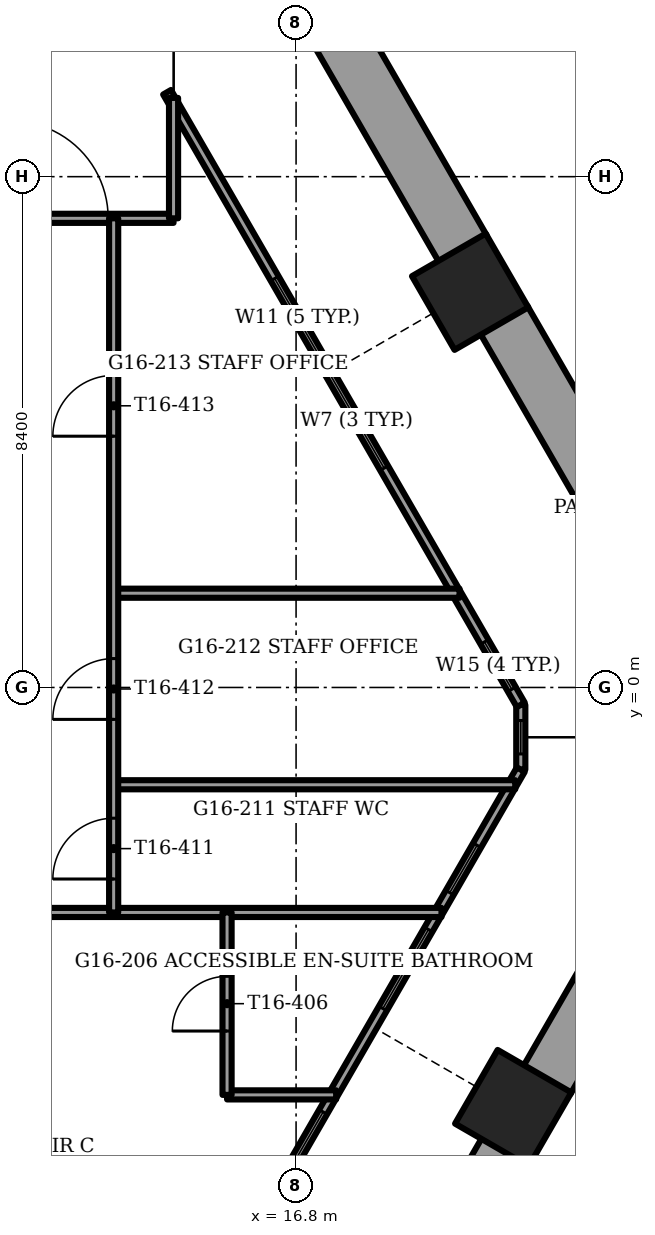
"""IFC4 building model, lengths in metres.
Left out: names, types, materials, properties, quantities, classifications, styles, units other than length and angle.
Written with IfcOpenShell. Run it as: python <this file> out.ifc"""

import sys

from ifc_helpers import new_model, si_unit, direction, frame, frame_2d, origin, origin_2d, place, context, subcontext, project, spatial, rectangle, extrude, element, fill, save


model = new_model("IFC4")
c1 = context("Model", 3, precision=1e-05, world=origin(), true_north=direction((0.0, 1.0)))
c2 = subcontext(c1, "Body", "Model", "MODEL_VIEW")
j1 = project(units=[si_unit("LENGTHUNIT", "METRE"), si_unit("PLANEANGLEUNIT", "RADIAN")], contexts=[c1])
p1 = place(None, origin())
s1 = spatial("IfcSite", under=j1, at=p1, CompositionType="ELEMENT")
p2 = place(p1, origin())
s2 = spatial("IfcBuilding", under=s1, at=p2, CompositionType="ELEMENT")
p3 = place(p2, frame((0.0, 0.0, 65.5)))
s3 = spatial("IfcBuildingStorey", under=s2, at=p3, CompositionType="ELEMENT", Elevation=65.5)
for number, where, z_axis, x_axis in (
    (1, (20.371, -6.917, -1.2), (0.0, 0.0, 1.0), (-0.5, -0.866, 0.0)),
    (2, (19.662, 6.508, -1.2), (0.0, 0.0, 1.0), (0.5, -0.866, 0.0)),
):
    element("IfcColumn", number, at=place(p3, frame(where, z_axis=z_axis, x_axis=x_axis)), inside=s3, PredefinedType="COLUMN", context=c2, shape_type="SweptSolid", body=[
        extrude(rectangle(XDim=1.4, YDim=1.4, at=origin_2d()), origin(), (0.0, 0.0, 1.0), 3.75),
    ])
p4 = place(p3, frame((16.727, -13.728, 0.0), z_axis=(0.0, 0.0, 1.0), x_axis=(0.499997206141, 0.866027016814, 0.0)))
e3 = element("IfcWall", 3, at=p4, inside=s3, PredefinedType="PARAPET", context=c2, shape_type="SweptSolid", body=[
    extrude(rectangle(XDim=7.051, YDim=0.9, at=frame_2d((3.525, 0.0))), origin(), (0.0, 0.0, 1.0), 1.1),
])
p5 = place(p3, frame((20.922, -6.461, 0.0), z_axis=(0.0, 0.0, 1.0), x_axis=(0.499996461177, 0.866027446915, 0.0)))
e4 = element("IfcWall", 4, at=p5, inside=s3, PredefinedType="PARAPET", context=c2, shape_type="SweptSolid", body=[
    extrude(rectangle(XDim=5.759, YDim=0.9, at=frame_2d((2.879, 0.0))), origin(), (0.0, 0.0, 1.0), 1.1),
])
p6 = place(p3, frame((23.802, -0.162, 0.0), z_axis=(0.0, 0.0, 1.0), x_axis=(-0.500014005679, 0.866017317451, 0.0)))
e5 = element("IfcWall", 5, at=p6, inside=s3, PredefinedType="PARAPET", context=c2, shape_type="SweptSolid", body=[
    extrude(rectangle(XDim=7.176, YDim=0.9, at=frame_2d((3.588, 0.0))), origin(), (0.0, 0.0, 1.0), 1.1),
])
p7 = place(p3, frame((19.544, 7.213, 0.0), z_axis=(0.0, 0.0, 1.0), x_axis=(-0.499997206141, 0.866027016814, 0.0)))
e6 = element("IfcWall", 6, at=p7, inside=s3, PredefinedType="PARAPET", context=c2, shape_type="SweptSolid", body=[
    extrude(rectangle(XDim=7.051, YDim=0.9, at=frame_2d((3.525, 0.0))), origin(), (0.0, 0.0, 1.0), 1.1),
])
p8 = place(p3, frame((14.679, -11.425, 0.0), z_axis=(0.0, 0.0, 1.0), x_axis=(0.500010091595, 0.866019577321, 0.0)))
e7 = element("IfcWall", 7, at=p8, inside=s3, PredefinedType="SOLIDWALL", context=c2, shape_type="SweptSolid", body=[
    extrude(rectangle(XDim=11.633, YDim=0.15, at=frame_2d((5.816, 0.0))), origin(), (0.0, 0.0, 1.0), 3.45),
])
p9 = place(p8, frame((3.632, 0.0, 0.15)))
e8 = element("IfcOpeningElement", 8, at=p9, cuts=e7, PredefinedType="OPENING", context=c2, shape_type="SweptSolid", body=[
    extrude(rectangle(XDim=1.5, YDim=2.2, at=frame_2d((0.75, 1.1))), frame((0.0, 0.075, 0.0), z_axis=(0.0, -1.0, 0.0), x_axis=(1.0, 0.0, 0.0)), (0.0, 0.0, 1.0), 0.15),
])
p10 = place(p8, frame((9.296, 0.0, 0.15)))
e9 = element("IfcOpeningElement", 9, at=p10, cuts=e7, PredefinedType="OPENING", context=c2, shape_type="SweptSolid", body=[
    extrude(rectangle(XDim=0.9, YDim=2.2, at=frame_2d((0.45, 1.1))), frame((0.0, 0.075, 0.0), z_axis=(0.0, -1.0, 0.0), x_axis=(1.0, 0.0, 0.0)), (0.0, 0.0, 1.0), 0.15),
])
p11 = place(p8, frame((7.096, 0.0, 0.15)))
e10 = element("IfcOpeningElement", 10, at=p11, cuts=e7, PredefinedType="OPENING", context=c2, shape_type="SweptSolid", body=[
    extrude(rectangle(XDim=1.5, YDim=2.2, at=frame_2d((0.75, 1.1))), frame((0.0, 0.075, 0.0), z_axis=(0.0, -1.0, 0.0), x_axis=(1.0, 0.0, 0.0)), (0.0, 0.0, 1.0), 0.15),
])
p12 = place(p3, frame((20.496, -0.286, 0.0), z_axis=(0.0, 0.0, 1.0), x_axis=(-0.500001004067, 0.866024824085, 0.0)))
e11 = element("IfcWall", 11, at=p12, inside=s3, PredefinedType="SOLIDWALL", context=c2, shape_type="SweptSolid", body=[
    extrude(rectangle(XDim=11.633, YDim=0.15, at=frame_2d((5.817, 0.0))), origin(), (0.0, 0.0, 1.0), 3.45),
])
p13 = place(p12, frame((0.295, 0.0, 0.15)))
e12 = element("IfcOpeningElement", 12, at=p13, cuts=e11, PredefinedType="OPENING", context=c2, shape_type="SweptSolid", body=[
    extrude(rectangle(XDim=0.9, YDim=2.2, at=frame_2d((0.45, 1.1))), frame((0.0, 0.075, 0.0), z_axis=(0.0, -1.0, 0.0), x_axis=(1.0, 0.0, 0.0)), (0.0, 0.0, 1.0), 0.15),
])
p14 = place(p12, frame((4.495, 0.0, 0.15)))
e13 = element("IfcOpeningElement", 13, at=p14, cuts=e11, PredefinedType="OPENING", context=c2, shape_type="SweptSolid", body=[
    extrude(rectangle(XDim=1.8, YDim=2.2, at=frame_2d((0.9, 1.1))), frame((0.0, 0.075, 0.0), z_axis=(0.0, -1.0, 0.0), x_axis=(1.0, 0.0, 0.0)), (0.0, 0.0, 1.0), 0.15),
])
p15 = place(p12, frame((6.595, 0.0, 0.15)))
e14 = element("IfcOpeningElement", 14, at=p15, cuts=e11, PredefinedType="OPENING", context=c2, shape_type="SweptSolid", body=[
    extrude(rectangle(XDim=1.5, YDim=2.2, at=frame_2d((0.75, 1.1))), frame((0.0, 0.075, 0.0), z_axis=(0.0, -1.0, 0.0), x_axis=(1.0, 0.0, 0.0)), (0.0, 0.0, 1.0), 0.15),
])
p16 = place(p3, frame((20.496, -1.351, 0.0), z_axis=(0.0, 0.0, 1.0), x_axis=(0.0, 1.0, 0.0)))
e15 = element("IfcWall", 15, at=p16, inside=s3, PredefinedType="SOLIDWALL", context=c2, shape_type="SweptSolid", body=[
    extrude(rectangle(XDim=1.065, YDim=0.15, at=frame_2d((0.532, 0.0))), origin(), (0.0, 0.0, 1.0), 3.45),
])
p17 = place(p16, frame((0.258, 0.0, 0.15)))
e16 = element("IfcOpeningElement", 16, at=p17, cuts=e15, PredefinedType="OPENING", context=c2, shape_type="SweptSolid", body=[
    extrude(rectangle(XDim=0.55, YDim=2.2, at=frame_2d((0.275, 1.1))), frame((0.0, 0.075, 0.0), z_axis=(0.0, -1.0, 0.0), x_axis=(1.0, 0.0, 0.0)), (0.0, 0.0, 1.0), 0.15),
])
p18 = place(p3, frame((15.665, -6.7, 0.0), z_axis=(0.0, 0.0, 1.0), x_axis=(1.0, 0.0, 0.0)))
e17 = element("IfcWall", 17, at=p18, inside=s3, PredefinedType="PARTITIONING", context=c2, shape_type="SweptSolid", body=[
    extrude(rectangle(XDim=1.794, YDim=0.15, at=frame_2d((0.897, 0.0))), origin(), (0.0, 0.0, 1.0), 3.45),
])
p19 = place(p3, frame((9.16, -3.7, 0.0), z_axis=(0.0, 0.0, 1.0), x_axis=(1.0, 0.0, 0.0)))
e18 = element("IfcWall", 18, at=p19, inside=s3, PredefinedType="PARTITIONING", context=c2, shape_type="SweptSolid", body=[
    extrude(rectangle(XDim=10.031, YDim=0.15, at=frame_2d((5.016, 0.0))), origin(), (0.0, 0.0, 1.0), 3.45),
])
p20 = place(p19, frame((0.24, 0.0, 0.0)))
e19 = element("IfcOpeningElement", 19, at=p20, cuts=e18, PredefinedType="OPENING", context=c2, shape_type="SweptSolid", body=[
    extrude(rectangle(XDim=1.0, YDim=2.1, at=frame_2d((0.5, 1.05))), frame((0.0, 0.075, 0.0), z_axis=(0.0, -1.0, 0.0), x_axis=(1.0, 0.0, 0.0)), (0.0, 0.0, 1.0), 0.15),
])
p21 = place(p3, frame((13.8, -1.6, 0.0), z_axis=(0.0, 0.0, 1.0), x_axis=(1.0, 0.0, 0.0)))
e20 = element("IfcWall", 20, at=p21, inside=s3, PredefinedType="PARTITIONING", context=c2, shape_type="SweptSolid", body=[
    extrude(rectangle(XDim=6.604, YDim=0.15, at=frame_2d((3.302, 0.0))), origin(), (0.0, 0.0, 1.0), 3.45),
])
p22 = place(p3, frame((13.8, 1.55, 0.0), z_axis=(0.0, 0.0, 1.0), x_axis=(1.0, 0.0, 0.0)))
e21 = element("IfcWall", 21, at=p22, inside=s3, PredefinedType="PARTITIONING", context=c2, shape_type="SweptSolid", body=[
    extrude(rectangle(XDim=5.688, YDim=0.15, at=frame_2d((2.844, 0.0))), origin(), (0.0, 0.0, 1.0), 3.45),
])
p23 = place(p3, frame((12.01, 7.715, 0.0), z_axis=(0.0, 0.0, 1.0), x_axis=(1.0, 0.0, 0.0)))
e22 = element("IfcWall", 22, at=p23, inside=s3, PredefinedType="PARTITIONING", context=c2, shape_type="SweptSolid", body=[
    extrude(rectangle(XDim=2.775, YDim=0.15, at=frame_2d((1.387, 0.0))), origin(), (0.0, 0.0, 1.0), 3.45),
])
p24 = place(p23, frame((0.1, 0.0, 0.0)))
e23 = element("IfcOpeningElement", 23, at=p24, cuts=e22, PredefinedType="OPENING", context=c2, shape_type="SweptSolid", body=[
    extrude(rectangle(XDim=1.6, YDim=2.1, at=frame_2d((0.8, 1.05))), frame((0.0, 0.075, 0.0), z_axis=(0.0, -1.0, 0.0), x_axis=(1.0, 0.0, 0.0)), (0.0, 0.0, 1.0), 0.15),
])
p25 = place(p3, frame((15.665, -6.7, 0.0), z_axis=(0.0, 0.0, 1.0), x_axis=(0.0, 1.0, 0.0)))
e24 = element("IfcWall", 24, at=p25, inside=s3, PredefinedType="PARTITIONING", context=c2, shape_type="SweptSolid", body=[
    extrude(rectangle(XDim=3.0, YDim=0.15, at=frame_2d((1.5, 0.0))), origin(), (0.0, 0.0, 1.0), 3.45),
])
p26 = place(p25, frame((1.05, 0.0, 0.0)))
e25 = element("IfcOpeningElement", 25, at=p26, cuts=e24, PredefinedType="OPENING", context=c2, shape_type="SweptSolid", body=[
    extrude(rectangle(XDim=0.9, YDim=2.1, at=frame_2d((0.45, 1.05))), frame((0.0, 0.075, 0.0), z_axis=(0.0, -1.0, 0.0), x_axis=(1.0, 0.0, 0.0)), (0.0, 0.0, 1.0), 0.15),
])
p27 = place(p3, frame((14.785, 7.715, 0.0), z_axis=(0.0, 0.0, 1.0), x_axis=(0.0, 1.0, 0.0)))
e26 = element("IfcWall", 26, at=p27, inside=s3, PredefinedType="PARTITIONING", context=c2, shape_type="SweptSolid", body=[
    extrude(rectangle(XDim=1.98, YDim=0.15, at=frame_2d((0.99, 0.0))), origin(), (0.0, 0.0, 1.0), 3.45),
])
p28 = place(p3, frame((13.8, -3.7, 0.0), z_axis=(0.0, 0.0, 1.0), x_axis=(0.0, 1.0, 0.0)))
e27 = element("IfcWall", 27, at=p28, inside=s3, PredefinedType="PARTITIONING", context=c2, shape_type="SweptSolid", body=[
    extrude(rectangle(XDim=11.415, YDim=0.15, at=frame_2d((5.708, 0.0))), origin(), (0.0, 0.0, 1.0), 3.45),
])
p29 = place(p28, frame((0.55, 0.0, 0.0)))
e28 = element("IfcOpeningElement", 28, at=p29, cuts=e27, PredefinedType="OPENING", context=c2, shape_type="SweptSolid", body=[
    extrude(rectangle(XDim=1.0, YDim=2.1, at=frame_2d((0.5, 1.05))), frame((0.0, 0.075, 0.0), z_axis=(0.0, -1.0, 0.0), x_axis=(1.0, 0.0, 0.0)), (0.0, 0.0, 1.0), 0.15),
])
p30 = place(p28, frame((3.175, 0.0, 0.0)))
e29 = element("IfcOpeningElement", 29, at=p30, cuts=e27, PredefinedType="OPENING", context=c2, shape_type="SweptSolid", body=[
    extrude(rectangle(XDim=1.0, YDim=2.1, at=frame_2d((0.5, 1.05))), frame((0.0, 0.075, 0.0), z_axis=(0.0, -1.0, 0.0), x_axis=(1.0, 0.0, 0.0)), (0.0, 0.0, 1.0), 0.15),
])
p31 = place(p28, frame((7.832, 0.0, 0.0)))
e30 = element("IfcOpeningElement", 30, at=p31, cuts=e27, PredefinedType="OPENING", context=c2, shape_type="SweptSolid", body=[
    extrude(rectangle(XDim=1.0, YDim=2.1, at=frame_2d((0.5, 1.05))), frame((0.0, 0.075, 0.0), z_axis=(0.0, -1.0, 0.0), x_axis=(1.0, 0.0, 0.0)), (0.0, 0.0, 1.0), 0.15),
])
p32 = place(p9, origin())
e31 = element("IfcWindow", 31, at=p32, inside=s3, PartitioningType="SINGLE_PANEL", PredefinedType="WINDOW", context=c2, shape_type="SweptSolid", body=[
    extrude(rectangle(XDim=1.5, YDim=2.2, at=frame_2d((0.75, 1.1))), frame((0.0, 0.03, 0.0), z_axis=(0.0, -1.0, 0.0), x_axis=(1.0, 0.0, 0.0)), (0.0, 0.0, 1.0), 0.06),
])
fill(e8, e31)
p33 = place(p10, origin())
e32 = element("IfcWindow", 32, at=p33, inside=s3, PartitioningType="SINGLE_PANEL", PredefinedType="WINDOW", context=c2, shape_type="SweptSolid", body=[
    extrude(rectangle(XDim=0.9, YDim=2.2, at=frame_2d((0.45, 1.1))), frame((0.0, 0.03, 0.0), z_axis=(0.0, -1.0, 0.0), x_axis=(1.0, 0.0, 0.0)), (0.0, 0.0, 1.0), 0.06),
])
fill(e9, e32)
p34 = place(p11, origin())
e33 = element("IfcWindow", 33, at=p34, inside=s3, PartitioningType="SINGLE_PANEL", PredefinedType="WINDOW", context=c2, shape_type="SweptSolid", body=[
    extrude(rectangle(XDim=1.5, YDim=2.2, at=frame_2d((0.75, 1.1))), frame((0.0, 0.03, 0.0), z_axis=(0.0, -1.0, 0.0), x_axis=(1.0, 0.0, 0.0)), (0.0, 0.0, 1.0), 0.06),
])
fill(e10, e33)
p35 = place(p13, origin())
e34 = element("IfcWindow", 34, at=p35, inside=s3, PartitioningType="SINGLE_PANEL", PredefinedType="WINDOW", context=c2, shape_type="SweptSolid", body=[
    extrude(rectangle(XDim=0.9, YDim=2.2, at=frame_2d((0.45, 1.1))), frame((0.0, 0.03, 0.0), z_axis=(0.0, -1.0, 0.0), x_axis=(1.0, 0.0, 0.0)), (0.0, 0.0, 1.0), 0.06),
])
fill(e12, e34)
p36 = place(p14, origin())
e35 = element("IfcWindow", 35, at=p36, inside=s3, PartitioningType="SINGLE_PANEL", PredefinedType="WINDOW", context=c2, shape_type="SweptSolid", body=[
    extrude(rectangle(XDim=1.8, YDim=2.2, at=frame_2d((0.9, 1.1))), frame((0.0, 0.03, 0.0), z_axis=(0.0, -1.0, 0.0), x_axis=(1.0, 0.0, 0.0)), (0.0, 0.0, 1.0), 0.06),
])
fill(e13, e35)
p37 = place(p15, origin())
e36 = element("IfcWindow", 36, at=p37, inside=s3, PartitioningType="SINGLE_PANEL", PredefinedType="WINDOW", context=c2, shape_type="SweptSolid", body=[
    extrude(rectangle(XDim=1.5, YDim=2.2, at=frame_2d((0.75, 1.1))), frame((0.0, 0.03, 0.0), z_axis=(0.0, -1.0, 0.0), x_axis=(1.0, 0.0, 0.0)), (0.0, 0.0, 1.0), 0.06),
])
fill(e14, e36)
p38 = place(p17, origin())
e37 = element("IfcWindow", 37, at=p38, inside=s3, PartitioningType="SINGLE_PANEL", PredefinedType="WINDOW", context=c2, shape_type="SweptSolid", body=[
    extrude(rectangle(XDim=0.55, YDim=2.2, at=frame_2d((0.275, 1.1))), frame((0.0, 0.03, 0.0), z_axis=(0.0, -1.0, 0.0), x_axis=(1.0, 0.0, 0.0)), (0.0, 0.0, 1.0), 0.06),
])
fill(e16, e37)
p39 = place(p26, origin())
e38 = element("IfcDoor", 38, at=p39, inside=s3, OperationType="SINGLE_SWING_RIGHT", PredefinedType="DOOR", context=c2, shape_type="SweptSolid", body=[
    extrude(rectangle(XDim=0.9, YDim=2.1, at=frame_2d((0.45, 1.05))), frame((0.0, 0.025, 0.0), z_axis=(0.0, -1.0, 0.0), x_axis=(1.0, 0.0, 0.0)), (0.0, 0.0, 1.0), 0.05),
])
fill(e25, e38)
p40 = place(p29, origin())
e39 = element("IfcDoor", 39, at=p40, inside=s3, OperationType="SINGLE_SWING_LEFT", PredefinedType="DOOR", context=c2, shape_type="SweptSolid", body=[
    extrude(rectangle(XDim=1.0, YDim=2.1, at=frame_2d((0.5, 1.05))), frame((0.0, 0.025, 0.0), z_axis=(0.0, -1.0, 0.0), x_axis=(1.0, 0.0, 0.0)), (0.0, 0.0, 1.0), 0.05),
])
fill(e28, e39)
p41 = place(p30, origin())
e40 = element("IfcDoor", 40, at=p41, inside=s3, OperationType="SINGLE_SWING_LEFT", PredefinedType="DOOR", context=c2, shape_type="SweptSolid", body=[
    extrude(rectangle(XDim=1.0, YDim=2.1, at=frame_2d((0.5, 1.05))), frame((0.0, 0.025, 0.0), z_axis=(0.0, -1.0, 0.0), x_axis=(1.0, 0.0, 0.0)), (0.0, 0.0, 1.0), 0.05),
])
fill(e29, e40)
p42 = place(p31, origin())
e41 = element("IfcDoor", 41, at=p42, inside=s3, OperationType="SINGLE_SWING_LEFT", PredefinedType="DOOR", context=c2, shape_type="SweptSolid", body=[
    extrude(rectangle(XDim=1.0, YDim=2.1, at=frame_2d((0.5, 1.05))), frame((0.0, 0.025, 0.0), z_axis=(0.0, -1.0, 0.0), x_axis=(1.0, 0.0, 0.0)), (0.0, 0.0, 1.0), 0.05),
])
fill(e30, e41)
p43 = place(p24, origin())
e42 = element("IfcDoor", 42, at=p43, inside=s3, OperationType="DOUBLE_DOOR_SINGLE_SWING", PredefinedType="DOOR", context=c2, shape_type="SweptSolid", body=[
    extrude(rectangle(XDim=1.6, YDim=2.1, at=frame_2d((0.8, 1.05))), frame((0.0, 0.025, 0.0), z_axis=(0.0, -1.0, 0.0), x_axis=(1.0, 0.0, 0.0)), (0.0, 0.0, 1.0), 0.05),
])
fill(e23, e42)
save(model, sys.argv[1])
